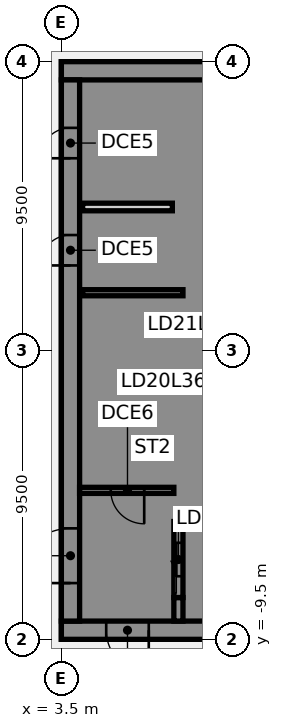
"""IFC4 building model, lengths in metres.
Left out: names, types, materials, properties, quantities, classifications, styles, units other than length and angle.
Written with IfcOpenShell. Run it as: python <this file> out.ifc"""

import sys

from ifc_helpers import new_model, si_unit, direction, frame, frame_2d, origin, place, context, subcontext, project, spatial, polyline, rectangle, outline, extrude, element, fill, save


model = new_model("IFC4")
c1 = context("Model", 3, precision=1e-05, world=origin(), true_north=direction((0.0, 1.0)))
c2 = subcontext(c1, "Body", "Model", "MODEL_VIEW")
j1 = project(units=[si_unit("LENGTHUNIT", "METRE"), si_unit("PLANEANGLEUNIT", "RADIAN")], contexts=[c1])
p1 = place(None, origin())
s1 = spatial("IfcSite", under=j1, at=p1, CompositionType="ELEMENT")
p2 = place(p1, origin())
s2 = spatial("IfcBuilding", under=s1, at=p2, CompositionType="ELEMENT")
p3 = place(p2, frame((0.0, 0.0, 148.0)))
s3 = spatial("IfcBuildingStorey", under=s2, at=p3, CompositionType="ELEMENT", Elevation=148.0)
p4 = place(p3, frame((16.5, -9.2, 0.0), z_axis=(0.0, 0.0, 1.0), x_axis=(-1.0, 0.0, 0.0)))
e1 = element("IfcWall", 1, at=p4, inside=s3, PredefinedType="SHEAR", context=c2, shape_type="SweptSolid", body=[
    extrude(rectangle(XDim=13.0, YDim=0.6, at=frame_2d((6.5, 0.0))), origin(), (0.0, 0.0, 1.0), 3.61),
])
p5 = place(p4, frame((4.15, 0.0, 0.0)))
e2 = element("IfcOpeningElement", 2, at=p5, cuts=e1, PredefinedType="OPENING", context=c2, shape_type="SweptSolid", body=[
    extrude(rectangle(XDim=1.4, YDim=2.1, at=frame_2d((0.7, 1.05))), frame((0.0, 0.31, 0.0), z_axis=(0.0, -1.0, 0.0), x_axis=(1.0, 0.0, 0.0)), (0.0, 0.0, 1.0), 0.62),
])
p6 = place(p4, frame((10.125, 0.0, 0.0)))
e3 = element("IfcOpeningElement", 3, at=p6, cuts=e1, PredefinedType="OPENING", context=c2, shape_type="SweptSolid", body=[
    extrude(rectangle(XDim=1.4, YDim=2.1, at=frame_2d((0.7, 1.05))), frame((0.0, 0.31, 0.0), z_axis=(0.0, -1.0, 0.0), x_axis=(1.0, 0.0, 0.0)), (0.0, 0.0, 1.0), 0.62),
])
p7 = place(p3, frame((16.5, 9.2, 0.0), z_axis=(0.0, 0.0, 1.0), x_axis=(-1.0, 0.0, 0.0)))
e4 = element("IfcWall", 4, at=p7, inside=s3, PredefinedType="SHEAR", context=c2, shape_type="SweptSolid", body=[
    extrude(rectangle(XDim=13.0, YDim=0.6, at=frame_2d((6.5, 0.0))), origin(), (0.0, 0.0, 1.0), 3.61),
])
p8 = place(p3, origin())
e5 = element("IfcWall", 5, at=p8, inside=s3, PredefinedType="SHEAR", context=c2, shape_type="SweptSolid", body=[
    extrude(outline(polyline([(9.8, -5.375), (7.5, -5.375), (7.5, -2.875), (9.8, -2.875), (9.8, -2.625), (7.5, -2.625), (7.5, -0.125), (9.8, -0.125), (9.8, 0.125), (7.5, 0.125), (7.5, 2.625), (9.8, 2.625), (9.8, 2.875), (7.5, 2.875), (7.5, 5.375), (9.8, 5.375), (9.8, 5.625), (7.5, 5.625), (7.5, 8.125), (9.8, 8.125), (9.8, 8.9), (7.5, 8.9), (7.2, 8.9), (7.2, -5.625), (7.5, -5.625), (9.8, -5.625), (9.8, -5.375)])), origin(), (0.0, 0.0, 1.0), 3.61),
])
p9 = place(p3, origin())
e6 = element("IfcWall", 6, at=p9, inside=s3, PredefinedType="SHEAR", context=c2, shape_type="SweptSolid", body=[
    extrude(outline(polyline([(7.5, -8.125), (7.5, -8.9), (9.8, -8.9), (9.8, -8.125), (9.8, -5.625), (9.55, -5.625), (9.55, -8.125), (7.5, -8.125)])), origin(), (0.0, 0.0, 1.0), 3.61),
])
p10 = place(p3, frame((7.35, -8.9, 0.0), z_axis=(0.0, 0.0, 1.0), x_axis=(0.0, 1.0, 0.0)))
e7 = element("IfcWall", 7, at=p10, inside=s3, PredefinedType="SHEAR", context=c2, shape_type="SweptSolid", body=[
    extrude(rectangle(XDim=0.775, YDim=0.3, at=frame_2d((0.387, 0.0))), origin(), (0.0, 0.0, 1.0), 3.61),
])
p11 = place(p3, frame((7.5, 1.9, 0.0), z_axis=(0.0, 0.0, 1.0), x_axis=(-1.0, 0.0, 0.0)))
e8 = element("IfcWall", 8, at=p11, inside=s3, PredefinedType="SHEAR", context=c2, shape_type="SweptSolid", body=[
    extrude(rectangle(XDim=3.3, YDim=0.2, at=frame_2d((1.65, 0.0))), origin(), (0.0, 0.0, 1.0), 3.61),
])
p12 = place(p3, frame((7.35, -8.125, 0.0), z_axis=(0.0, 0.0, 1.0), x_axis=(0.0, 1.0, 0.0)))
e9 = element("IfcWall", 9, at=p12, inside=s3, PredefinedType="SHEAR", context=c2, shape_type="SweptSolid", body=[
    extrude(rectangle(XDim=2.5, YDim=0.3, at=frame_2d((1.25, 0.0))), origin(), (0.0, 0.0, 1.0), 3.61),
])
p13 = place(p12, frame((0.7, 0.0, 0.0)))
e10 = element("IfcOpeningElement", 10, at=p13, cuts=e9, PredefinedType="OPENING", context=c2, shape_type="SweptSolid", body=[
    extrude(rectangle(XDim=1.1, YDim=2.1, at=frame_2d((0.55, 1.05))), frame((0.0, 0.16, 0.0), z_axis=(0.0, -1.0, 0.0), x_axis=(1.0, 0.0, 0.0)), (0.0, 0.0, 1.0), 0.32),
])
p14 = place(p3, frame((3.8, -8.9, 0.0), z_axis=(0.0, 0.0, 1.0), x_axis=(0.0, 1.0, 0.0)))
e11 = element("IfcWall", 11, at=p14, inside=s3, PredefinedType="SHEAR", context=c2, shape_type="SweptSolid", body=[
    extrude(rectangle(XDim=17.8, YDim=0.6, at=frame_2d((8.9, 0.0))), origin(), (0.0, 0.0, 1.0), 3.61),
])
p15 = place(p14, frame((1.25, 0.0, 0.0)))
e12 = element("IfcOpeningElement", 12, at=p15, cuts=e11, PredefinedType="OPENING", context=c2, shape_type="SweptSolid", body=[
    extrude(rectangle(XDim=1.8, YDim=2.1, at=frame_2d((0.9, 1.05))), frame((0.0, 0.31, 0.0), z_axis=(0.0, -1.0, 0.0), x_axis=(1.0, 0.0, 0.0)), (0.0, 0.0, 1.0), 0.62),
])
p16 = place(p14, frame((11.698, 0.0, 0.0)))
e13 = element("IfcOpeningElement", 13, at=p16, cuts=e11, PredefinedType="OPENING", context=c2, shape_type="SweptSolid", body=[
    extrude(rectangle(XDim=1.0, YDim=2.1, at=frame_2d((0.5, 1.05))), frame((0.0, 0.31, 0.0), z_axis=(0.0, -1.0, 0.0), x_axis=(1.0, 0.0, 0.0)), (0.0, 0.0, 1.0), 0.62),
])
p17 = place(p14, frame((15.222, 0.0, 0.0)))
e14 = element("IfcOpeningElement", 14, at=p17, cuts=e11, PredefinedType="OPENING", context=c2, shape_type="SweptSolid", body=[
    extrude(rectangle(XDim=1.0, YDim=2.1, at=frame_2d((0.5, 1.05))), frame((0.0, 0.31, 0.0), z_axis=(0.0, -1.0, 0.0), x_axis=(1.0, 0.0, 0.0)), (0.0, 0.0, 1.0), 0.62),
])
p18 = place(p3, frame((7.15, 4.72, 0.0), z_axis=(0.0, 0.0, 1.0), x_axis=(-1.0, 0.0, 0.0)))
e15 = element("IfcWall", 15, at=p18, inside=s3, PredefinedType="PARTITIONING", context=c2, shape_type="SweptSolid", body=[
    extrude(rectangle(XDim=2.95, YDim=0.25, at=frame_2d((1.475, 0.0))), origin(), (0.0, 0.0, 1.0), 3.61),
])
p19 = place(p3, frame((7.2, -4.6, 0.0), z_axis=(0.0, 0.0, 1.0), x_axis=(-1.0, 0.0, 0.0)))
e16 = element("IfcWall", 16, at=p19, inside=s3, PredefinedType="SHEAR", context=c2, shape_type="SweptSolid", body=[
    extrude(rectangle(XDim=3.1, YDim=0.2, at=frame_2d((1.55, 0.0))), origin(), (0.0, 0.0, 1.0), 3.61),
])
p20 = place(p19, frame((0.975, 0.0, 0.0)))
e17 = element("IfcOpeningElement", 17, at=p20, cuts=e16, PredefinedType="OPENING", context=c2, shape_type="SweptSolid", body=[
    extrude(rectangle(XDim=1.1, YDim=2.1, at=frame_2d((0.55, 1.05))), frame((0.0, 0.11, 0.0), z_axis=(0.0, -1.0, 0.0), x_axis=(1.0, 0.0, 0.0)), (0.0, 0.0, 1.0), 0.22),
])
p21 = place(p6, origin())
e18 = element("IfcDoor", 18, at=p21, inside=s3, OperationType="SINGLE_SWING_LEFT", PredefinedType="DOOR", context=c2, shape_type="SweptSolid", body=[
    extrude(rectangle(XDim=1.4, YDim=2.1, at=frame_2d((0.7, 1.05))), frame((0.0, 0.025, 0.0), z_axis=(0.0, -1.0, 0.0), x_axis=(1.0, 0.0, 0.0)), (0.0, 0.0, 1.0), 0.05),
])
fill(e3, e18)
p22 = place(p15, origin())
e19 = element("IfcDoor", 19, at=p22, inside=s3, OperationType="SINGLE_SWING_LEFT", PredefinedType="DOOR", context=c2, shape_type="SweptSolid", body=[
    extrude(rectangle(XDim=1.8, YDim=2.1, at=frame_2d((0.9, 1.05))), frame((0.0, 0.025, 0.0), z_axis=(0.0, -1.0, 0.0), x_axis=(1.0, 0.0, 0.0)), (0.0, 0.0, 1.0), 0.05),
])
fill(e12, e19)
p23 = place(p16, origin())
e20 = element("IfcDoor", 20, at=p23, inside=s3, OperationType="SINGLE_SWING_LEFT", PredefinedType="DOOR", context=c2, shape_type="SweptSolid", body=[
    extrude(rectangle(XDim=1.0, YDim=2.1, at=frame_2d((0.5, 1.05))), frame((0.0, -0.225, 0.0), z_axis=(0.0, -1.0, 0.0), x_axis=(1.0, 0.0, 0.0)), (0.0, 0.0, 1.0), 0.05),
])
fill(e13, e20)
p24 = place(p17, origin())
e21 = element("IfcDoor", 21, at=p24, inside=s3, OperationType="SINGLE_SWING_LEFT", PredefinedType="DOOR", context=c2, shape_type="SweptSolid", body=[
    extrude(rectangle(XDim=1.0, YDim=2.1, at=frame_2d((0.5, 1.05))), frame((0.0, -0.225, 0.0), z_axis=(0.0, -1.0, 0.0), x_axis=(1.0, 0.0, 0.0)), (0.0, 0.0, 1.0), 0.05),
])
fill(e14, e21)
p25 = place(p20, origin())
e22 = element("IfcDoor", 22, at=p25, inside=s3, OperationType="SINGLE_SWING_LEFT", PredefinedType="DOOR", context=c2, shape_type="SweptSolid", body=[
    extrude(rectangle(XDim=1.1, YDim=2.1, at=frame_2d((0.55, 1.05))), frame((0.0, 0.025, 0.0), z_axis=(0.0, -1.0, 0.0), x_axis=(1.0, 0.0, 0.0)), (0.0, 0.0, 1.0), 0.05),
])
fill(e17, e22)
p26 = place(p13, origin())
e23 = element("IfcDoor", 23, at=p26, inside=s3, OperationType="SLIDING_TO_LEFT", PredefinedType="DOOR", context=c2, shape_type="SweptSolid", body=[
    extrude(rectangle(XDim=1.1, YDim=2.1, at=frame_2d((0.55, 1.05))), frame((0.0, 0.025, 0.0), z_axis=(0.0, -1.0, 0.0), x_axis=(1.0, 0.0, 0.0)), (0.0, 0.0, 1.0), 0.05),
])
fill(e10, e23)
save(model, sys.argv[1])
